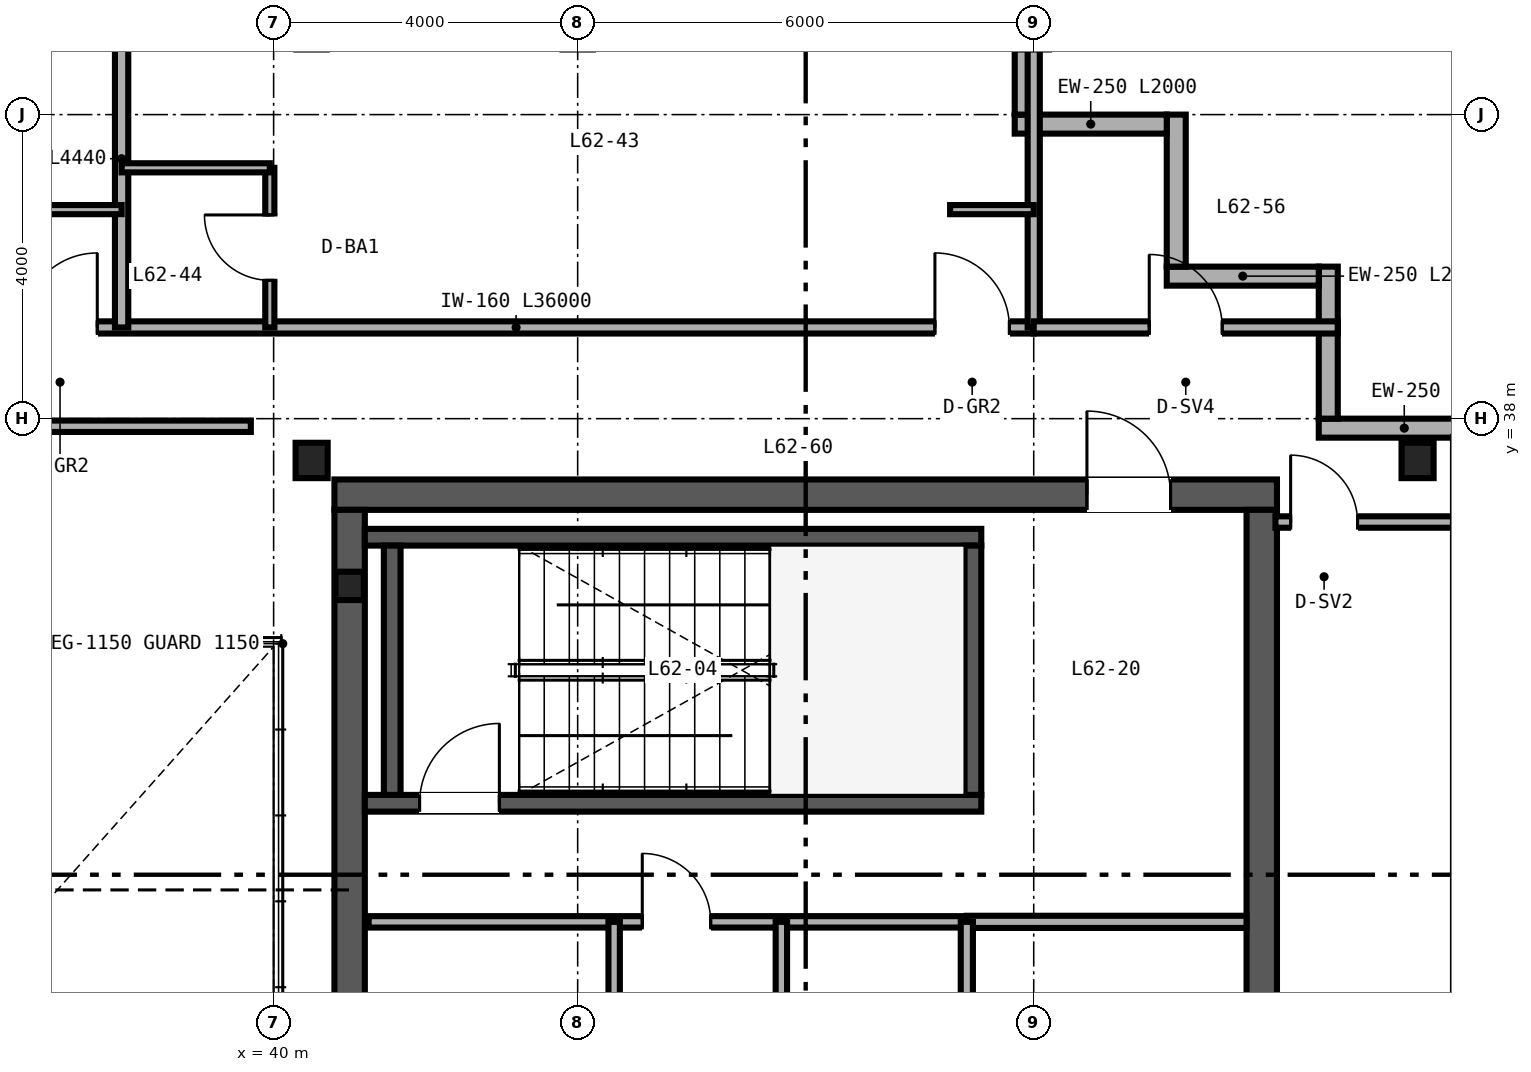
"""IFC4 building model, lengths in metres.
Left out: names, types, materials, properties, quantities, classifications, styles, units other than length and angle.
Written with IfcOpenShell. Run it as: python <this file> out.ifc"""

import sys

from ifc_helpers import new_model, si_unit, direction, frame, frame_2d, origin, origin_2d, place, context, subcontext, project, spatial, rectangle, i_section, extrude, source, transform, mapped, element, fill, save


model = new_model("IFC4")
c1 = context("Model", 3, precision=1e-05, world=origin(), true_north=direction((0.0, 1.0)))
c2 = subcontext(c1, "Body", "Model", "MODEL_VIEW")
j1 = project(units=[si_unit("LENGTHUNIT", "METRE"), si_unit("PLANEANGLEUNIT", "RADIAN")], contexts=[c1])
p1 = place(None, origin())
s1 = spatial("IfcSite", under=j1, at=p1, CompositionType="ELEMENT")
p2 = place(p1, origin())
s2 = spatial("IfcBuilding", under=s1, at=p2, CompositionType="ELEMENT")
p3 = place(p2, frame((0.0, 0.0, 247.2)))
s3 = spatial("IfcBuildingStorey", under=s2, at=p3, CompositionType="ELEMENT", Elevation=247.2)
m1 = source(origin(), c2, "Body", "SweptSolid", [
    extrude(i_section(OverallWidth=0.374, OverallDepth=0.373, WebThickness=0.016, FlangeThickness=0.026, FilletRadius=0.025, at=origin_2d()), origin(), (0.0, 0.0, 1.0), 3.6),
])
p4 = place(p3, frame((41.0, 35.8, 0.0), z_axis=(0.0, 0.0, 1.0), x_axis=(1.0, 0.0, 0.0)))
e1 = element("IfcColumn", 1, at=p4, inside=s3, PredefinedType="COLUMN", context=c2, shape_type="MappedRepresentation", body=[
    mapped(m1, transform((0.0, 0.0, 0.0), scale=1.0)),
])
p5 = place(p3, frame((40.8, 37.0, 0.0), z_axis=(0.0, 0.0, 1.0), x_axis=(1.0, 0.0, 0.0)))
e2 = element("IfcWall", 2, at=p5, inside=s3, PredefinedType="SHEAR", context=c2, shape_type="SweptSolid", body=[
    extrude(rectangle(XDim=12.4, YDim=0.4, at=frame_2d((6.2, 0.0))), origin(), (0.0, 0.0, 1.0), 3.38),
])
p6 = place(p5, frame((9.9, 0.0, 0.0)))
e3 = element("IfcOpeningElement", 3, at=p6, cuts=e2, PredefinedType="OPENING", context=c2, shape_type="SweptSolid", body=[
    extrude(rectangle(XDim=1.1, YDim=2.15, at=frame_2d((0.55, 1.075))), frame((0.0, 0.21, 0.0), z_axis=(0.0, -1.0, 0.0), x_axis=(1.0, 0.0, 0.0)), (0.0, 0.0, 1.0), 0.42),
])
for number, where, z_axis, x_axis in (
    (4, (41.0, 15.2, 0.0), (0.0, 0.0, 1.0), (0.0, 1.0, 0.0)),
    (5, (53.0, 15.2, 0.0), (0.0, 0.0, 1.0), (0.0, 1.0, 0.0)),
):
    element("IfcWall", number, at=place(p3, frame(where, z_axis=z_axis, x_axis=x_axis)), inside=s3, PredefinedType="SHEAR", context=c2, shape_type="SweptSolid", body=[
        extrude(rectangle(XDim=21.6, YDim=0.4, at=frame_2d((10.8, 0.0))), origin(), (0.0, 0.0, 1.0), 3.38),
    ])
p7 = place(p3, frame((41.2, 32.94, 0.0), z_axis=(0.0, 0.0, 1.0), x_axis=(1.0, 0.0, 0.0)))
e6 = element("IfcWall", 6, at=p7, inside=s3, PredefinedType="SHEAR", context=c2, shape_type="SweptSolid", body=[
    extrude(rectangle(XDim=8.11, YDim=0.22, at=frame_2d((4.055, 0.0))), origin(), (0.0, 0.0, 1.0), 3.4),
])
p8 = place(p7, frame((0.72, 0.0, 0.0)))
e7 = element("IfcOpeningElement", 7, at=p8, cuts=e6, PredefinedType="OPENING", context=c2, shape_type="SweptSolid", body=[
    extrude(rectangle(XDim=1.05, YDim=2.15, at=frame_2d((0.525, 1.075))), frame((0.0, 0.12, 0.0), z_axis=(0.0, -1.0, 0.0), x_axis=(1.0, 0.0, 0.0)), (0.0, 0.0, 1.0), 0.24),
])
p9 = place(p3, frame((41.2, 36.44, 0.0), z_axis=(0.0, 0.0, 1.0), x_axis=(1.0, 0.0, 0.0)))
e8 = element("IfcWall", 8, at=p9, inside=s3, PredefinedType="SHEAR", context=c2, shape_type="SweptSolid", body=[
    extrude(rectangle(XDim=8.11, YDim=0.22, at=frame_2d((4.055, 0.0))), origin(), (0.0, 0.0, 1.0), 3.4),
])
for number, where, z_axis, x_axis in (
    (9, (41.56, 33.05, 0.0), (0.0, 0.0, 1.0), (0.0, 1.0, 0.0)),
    (10, (49.2, 33.05, 0.0), (0.0, 0.0, 1.0), (0.0, 1.0, 0.0)),
):
    element("IfcWall", number, at=place(p3, frame(where, z_axis=z_axis, x_axis=x_axis)), inside=s3, PredefinedType="SHEAR", context=c2, shape_type="SweptSolid", body=[
        extrude(rectangle(XDim=3.28, YDim=0.22, at=frame_2d((1.64, 0.0))), origin(), (0.0, 0.0, 1.0), 3.4),
    ])
m2 = source(origin(), c2, "Body", "SweptSolid", [
    extrude(i_section(OverallWidth=0.422, OverallDepth=0.465, WebThickness=0.045, FlangeThickness=0.073, FilletRadius=0.025, at=origin_2d()), origin(), (0.0, 0.0, 1.0), 3.38),
])
for number, where, z_axis, x_axis in (
    (11, (40.5, 37.45, 0.0), (0.0, 0.0, 1.0), (1.0, 0.0, 0.0)),
    (12, (55.05, 37.45, 0.0), (0.0, 0.0, 1.0), (1.0, 0.0, 0.0)),
):
    element("IfcColumn", number, at=place(p3, frame(where, z_axis=z_axis, x_axis=x_axis)), inside=s3, PredefinedType="COLUMN", context=c2, shape_type="MappedRepresentation", body=[
        mapped(m2, transform((0.0, 0.0, 0.0), scale=1.0)),
    ])
p10 = place(p3, frame((56.0, 37.875, 0.0), z_axis=(0.0, 0.0, 1.0), x_axis=(-1.0, 0.0, 0.0)))
e13 = element("IfcWall", 13, at=p10, inside=s3, PredefinedType="SOLIDWALL", context=c2, shape_type="SweptSolid", body=[
    extrude(rectangle(XDim=2.25, YDim=0.25, at=frame_2d((1.125, 0.0))), origin(), (0.0, 0.0, 1.0), 3.38),
])
for number, where, z_axis, x_axis in (
    (14, (53.875, 38.0, 0.0), (0.0, 0.0, 1.0), (0.0, 1.0, 0.0)),
    (15, (53.75, 39.875, 0.0), (0.0, 0.0, 1.0), (-1.0, 0.0, 0.0)),
    (16, (51.875, 40.0, 0.0), (0.0, 0.0, 1.0), (0.0, 1.0, 0.0)),
    (17, (51.75, 41.875, 0.0), (0.0, 0.0, 1.0), (-1.0, 0.0, 0.0)),
):
    element("IfcWall", number, at=place(p3, frame(where, z_axis=z_axis, x_axis=x_axis)), inside=s3, PredefinedType="SOLIDWALL", context=c2, shape_type="SweptSolid", body=[
        extrude(rectangle(XDim=2.0, YDim=0.25, at=frame_2d((1.0, 0.0))), origin(), (0.0, 0.0, 1.0), 3.38),
    ])
p11 = place(p3, frame((49.875, 42.0, 0.0), z_axis=(0.0, 0.0, 1.0), x_axis=(0.0, 1.0, 0.0)))
e18 = element("IfcWall", 18, at=p11, inside=s3, PredefinedType="SOLIDWALL", context=c2, shape_type="SweptSolid", body=[
    extrude(rectangle(XDim=2.0, YDim=0.25, at=frame_2d((1.0, 0.0))), origin(), (0.0, 0.0, 1.0), 2.687),
])
p12 = place(p3, frame((41.25, 31.38, 0.0), z_axis=(0.0, 0.0, 1.0), x_axis=(1.0, 0.0, 0.0)))
e19 = element("IfcWall", 19, at=p12, inside=s3, PredefinedType="PARTITIONING", context=c2, shape_type="SweptSolid", body=[
    extrude(rectangle(XDim=7.87, YDim=0.15, at=frame_2d((3.935, 0.0))), origin(), (0.0, 0.0, 1.0), 2.48),
])
p13 = place(p12, frame((3.6, 0.0, 0.0)))
e20 = element("IfcOpeningElement", 20, at=p13, cuts=e19, PredefinedType="OPENING", context=c2, shape_type="SweptSolid", body=[
    extrude(rectangle(XDim=0.9, YDim=2.15, at=frame_2d((0.45, 1.075))), frame((0.0, 0.085, 0.0), z_axis=(0.0, -1.0, 0.0), x_axis=(1.0, 0.0, 0.0)), (0.0, 0.0, 1.0), 0.17),
])
p14 = place(p3, frame((46.68, 15.25, 0.0), z_axis=(0.0, 0.0, 1.0), x_axis=(0.0, 1.0, 0.0)))
e21 = element("IfcWall", 21, at=p14, inside=s3, PredefinedType="PARTITIONING", context=c2, shape_type="SweptSolid", body=[
    extrude(rectangle(XDim=16.13, YDim=0.15, at=frame_2d((8.065, 0.0))), origin(), (0.0, 0.0, 1.0), 2.453),
])
p15 = place(p14, frame((2.0, 0.0, 0.0)))
e22 = element("IfcOpeningElement", 22, at=p15, cuts=e21, PredefinedType="OPENING", context=c2, shape_type="SweptSolid", body=[
    extrude(rectangle(XDim=0.84, YDim=2.1, at=frame_2d((0.42, 1.05))), frame((0.0, 0.085, 0.0), z_axis=(0.0, -1.0, 0.0), x_axis=(1.0, 0.0, 0.0)), (0.0, 0.0, 1.0), 0.17),
])
p16 = place(p14, frame((7.2, 0.0, 0.0)))
e23 = element("IfcOpeningElement", 23, at=p16, cuts=e21, PredefinedType="OPENING", context=c2, shape_type="SweptSolid", body=[
    extrude(rectangle(XDim=0.84, YDim=2.1, at=frame_2d((0.42, 1.05))), frame((0.0, 0.085, 0.0), z_axis=(0.0, -1.0, 0.0), x_axis=(1.0, 0.0, 0.0)), (0.0, 0.0, 1.0), 0.17),
])
p17 = place(p14, frame((12.6, 0.0, 0.0)))
e24 = element("IfcOpeningElement", 24, at=p17, cuts=e21, PredefinedType="OPENING", context=c2, shape_type="SweptSolid", body=[
    extrude(rectangle(XDim=0.84, YDim=2.1, at=frame_2d((0.42, 1.05))), frame((0.0, 0.085, 0.0), z_axis=(0.0, -1.0, 0.0), x_axis=(1.0, 0.0, 0.0)), (0.0, 0.0, 1.0), 0.17),
])
p18 = place(p3, frame((49.12, 31.38, 0.0), z_axis=(0.0, 0.0, 1.0), x_axis=(1.0, 0.0, 0.0)))
e25 = element("IfcWall", 25, at=p18, inside=s3, PredefinedType="PARTITIONING", context=c2, shape_type="SweptSolid", body=[
    extrude(rectangle(XDim=3.68, YDim=0.16, at=frame_2d((1.84, 0.0))), origin(), (0.0, 0.0, 1.0), 2.48),
])
p19 = place(p3, frame((49.12, 15.25, 0.0), z_axis=(0.0, 0.0, 1.0), x_axis=(0.0, 1.0, 0.0)))
e26 = element("IfcWall", 26, at=p19, inside=s3, PredefinedType="PARTITIONING", context=c2, shape_type="SweptSolid", body=[
    extrude(rectangle(XDim=16.13, YDim=0.16, at=frame_2d((8.065, 0.0))), origin(), (0.0, 0.0, 1.0), 2.453),
])
p20 = place(p19, frame((3.8, 0.0, 0.0)))
e27 = element("IfcOpeningElement", 27, at=p20, cuts=e26, PredefinedType="OPENING", context=c2, shape_type="SweptSolid", body=[
    extrude(rectangle(XDim=0.92, YDim=2.15, at=frame_2d((0.46, 1.075))), frame((0.0, 0.09, 0.0), z_axis=(0.0, -1.0, 0.0), x_axis=(1.0, 0.0, 0.0)), (0.0, 0.0, 1.0), 0.18),
])
p21 = place(p19, frame((11.8, 0.0, 0.0)))
e28 = element("IfcOpeningElement", 28, at=p21, cuts=e26, PredefinedType="OPENING", context=c2, shape_type="SweptSolid", body=[
    extrude(rectangle(XDim=0.9, YDim=2.15, at=frame_2d((0.45, 1.075))), frame((0.0, 0.09, 0.0), z_axis=(0.0, -1.0, 0.0), x_axis=(1.0, 0.0, 0.0)), (0.0, 0.0, 1.0), 0.18),
])
p22 = place(p3, frame((44.48, 15.25, 0.0), z_axis=(0.0, 0.0, 1.0), x_axis=(0.0, 1.0, 0.0)))
e29 = element("IfcWall", 29, at=p22, inside=s3, PredefinedType="PARTITIONING", context=c2, shape_type="SweptSolid", body=[
    extrude(rectangle(XDim=16.13, YDim=0.15, at=frame_2d((8.065, 0.0))), origin(), (0.0, 0.0, 1.0), 2.453),
])
p23 = place(p22, frame((1.6, 0.0, 0.0)))
e30 = element("IfcOpeningElement", 30, at=p23, cuts=e29, PredefinedType="OPENING", context=c2, shape_type="SweptSolid", body=[
    extrude(rectangle(XDim=0.84, YDim=2.1, at=frame_2d((0.42, 1.05))), frame((0.0, 0.085, 0.0), z_axis=(0.0, -1.0, 0.0), x_axis=(1.0, 0.0, 0.0)), (0.0, 0.0, 1.0), 0.17),
])
p24 = place(p22, frame((5.85, 0.0, 0.0)))
e31 = element("IfcOpeningElement", 31, at=p24, cuts=e29, PredefinedType="OPENING", context=c2, shape_type="SweptSolid", body=[
    extrude(rectangle(XDim=0.84, YDim=2.1, at=frame_2d((0.42, 1.05))), frame((0.0, 0.085, 0.0), z_axis=(0.0, -1.0, 0.0), x_axis=(1.0, 0.0, 0.0)), (0.0, 0.0, 1.0), 0.17),
])
p25 = place(p22, frame((10.05, 0.0, 0.0)))
e32 = element("IfcOpeningElement", 32, at=p25, cuts=e29, PredefinedType="OPENING", context=c2, shape_type="SweptSolid", body=[
    extrude(rectangle(XDim=0.84, YDim=2.1, at=frame_2d((0.42, 1.05))), frame((0.0, 0.085, 0.0), z_axis=(0.0, -1.0, 0.0), x_axis=(1.0, 0.0, 0.0)), (0.0, 0.0, 1.0), 0.17),
])
p26 = place(p3, frame((24.3, 37.9, 0.0), z_axis=(0.0, 0.0, 1.0), x_axis=(1.0, 0.0, 0.0)))
e33 = element("IfcWall", 33, at=p26, inside=s3, PredefinedType="PARTITIONING", context=c2, shape_type="SweptSolid", body=[
    extrude(rectangle(XDim=15.4, YDim=0.15, at=frame_2d((7.7, 0.0))), origin(), (0.0, 0.0, 1.0), 3.38),
])
p27 = place(p26, frame((7.0, 0.0, 0.0)))
e34 = element("IfcOpeningElement", 34, at=p27, cuts=e33, PredefinedType="OPENING", context=c2, shape_type="SweptSolid", body=[
    extrude(rectangle(XDim=0.96, YDim=2.15, at=frame_2d((0.48, 1.075))), frame((0.0, 0.085, 0.0), z_axis=(0.0, -1.0, 0.0), x_axis=(1.0, 0.0, 0.0)), (0.0, 0.0, 1.0), 0.17),
])
p28 = place(p3, frame((14.0, 39.2, 0.0), z_axis=(0.0, 0.0, 1.0), x_axis=(1.0, 0.0, 0.0)))
e35 = element("IfcWall", 35, at=p28, inside=s3, PredefinedType="PARTITIONING", context=c2, shape_type="SweptSolid", body=[
    extrude(rectangle(XDim=36.0, YDim=0.16, at=frame_2d((18.0, 0.0))), origin(), (0.0, 0.0, 1.0), 2.923),
])
p29 = place(p28, frame((10.7, 0.0, 0.0)))
e36 = element("IfcOpeningElement", 36, at=p29, cuts=e35, PredefinedType="OPENING", context=c2, shape_type="SweptSolid", body=[
    extrude(rectangle(XDim=0.98, YDim=2.2, at=frame_2d((0.49, 1.1))), frame((0.0, 0.09, 0.0), z_axis=(0.0, -1.0, 0.0), x_axis=(1.0, 0.0, 0.0)), (0.0, 0.0, 1.0), 0.18),
])
p30 = place(p28, frame((22.7, 0.0, 0.0)))
e37 = element("IfcOpeningElement", 37, at=p30, cuts=e35, PredefinedType="OPENING", context=c2, shape_type="SweptSolid", body=[
    extrude(rectangle(XDim=0.98, YDim=2.2, at=frame_2d((0.49, 1.1))), frame((0.0, 0.09, 0.0), z_axis=(0.0, -1.0, 0.0), x_axis=(1.0, 0.0, 0.0)), (0.0, 0.0, 1.0), 0.18),
])
p31 = place(p28, frame((34.7, 0.0, 0.0)))
e38 = element("IfcOpeningElement", 38, at=p31, cuts=e35, PredefinedType="OPENING", context=c2, shape_type="SweptSolid", body=[
    extrude(rectangle(XDim=0.98, YDim=2.2, at=frame_2d((0.49, 1.1))), frame((0.0, 0.09, 0.0), z_axis=(0.0, -1.0, 0.0), x_axis=(1.0, 0.0, 0.0)), (0.0, 0.0, 1.0), 0.18),
])
p32 = place(p3, frame((50.0, 39.2, 0.0), z_axis=(0.0, 0.0, 1.0), x_axis=(0.0, 1.0, 0.0)))
e39 = element("IfcWall", 39, at=p32, inside=s3, PredefinedType="PARTITIONING", context=c2, shape_type="SweptSolid", body=[
    extrude(rectangle(XDim=4.44, YDim=0.16, at=frame_2d((2.22, 0.0))), origin(), (0.0, 0.0, 1.0), 2.687),
])
p33 = place(p3, frame((38.0, 39.2, 0.0), z_axis=(0.0, 0.0, 1.0), x_axis=(0.0, 1.0, 0.0)))
e40 = element("IfcWall", 40, at=p33, inside=s3, PredefinedType="PARTITIONING", context=c2, shape_type="SweptSolid", body=[
    extrude(rectangle(XDim=4.44, YDim=0.175, at=frame_2d((2.22, 0.0))), origin(), (0.0, 0.0, 1.0), 2.432),
])
p34 = place(p3, frame((36.9, 40.75, 0.0), z_axis=(0.0, 0.0, 1.0), x_axis=(1.0, 0.0, 0.0)))
e41 = element("IfcWall", 41, at=p34, inside=s3, PredefinedType="PARTITIONING", context=c2, shape_type="SweptSolid", body=[
    extrude(rectangle(XDim=1.1, YDim=0.12, at=frame_2d((0.55, 0.0))), origin(), (0.0, 0.0, 1.0), 3.38),
])
p35 = place(p3, frame((39.95, 39.2, 0.0), z_axis=(0.0, 0.0, 1.0), x_axis=(0.0, 1.0, 0.0)))
e42 = element("IfcWall", 42, at=p35, inside=s3, PredefinedType="PARTITIONING", context=c2, shape_type="SweptSolid", body=[
    extrude(rectangle(XDim=2.1, YDim=0.12, at=frame_2d((1.05, 0.0))), origin(), (0.0, 0.0, 1.0), 3.38),
])
p36 = place(p35, frame((0.62, 0.0, 0.0)))
e43 = element("IfcOpeningElement", 43, at=p36, cuts=e42, PredefinedType="OPENING", context=c2, shape_type="SweptSolid", body=[
    extrude(rectangle(XDim=0.86, YDim=2.1, at=frame_2d((0.43, 1.05))), frame((0.0, 0.07, 0.0), z_axis=(0.0, -1.0, 0.0), x_axis=(1.0, 0.0, 0.0)), (0.0, 0.0, 1.0), 0.14),
])
p37 = place(p3, frame((38.0, 41.3, 0.0), z_axis=(0.0, 0.0, 1.0), x_axis=(1.0, 0.0, 0.0)))
e44 = element("IfcWall", 44, at=p37, inside=s3, PredefinedType="PARTITIONING", context=c2, shape_type="SweptSolid", body=[
    extrude(rectangle(XDim=1.95, YDim=0.12, at=frame_2d((0.975, 0.0))), origin(), (0.0, 0.0, 1.0), 3.38),
])
p38 = place(p3, frame((48.9, 40.75, 0.0), z_axis=(0.0, 0.0, 1.0), x_axis=(1.0, 0.0, 0.0)))
e45 = element("IfcWall", 45, at=p38, inside=s3, PredefinedType="PARTITIONING", context=c2, shape_type="SweptSolid", body=[
    extrude(rectangle(XDim=1.1, YDim=0.12, at=frame_2d((0.55, 0.0))), origin(), (0.0, 0.0, 1.0), 3.38),
])
p39 = place(p3, frame((53.18, 36.64, 0.0), z_axis=(0.0, 0.0, 1.0), x_axis=(1.0, 0.0, 0.0)))
e46 = element("IfcWall", 46, at=p39, inside=s3, PredefinedType="PARTITIONING", context=c2, shape_type="SweptSolid", body=[
    extrude(rectangle(XDim=2.66, YDim=0.15, at=frame_2d((1.33, 0.0))), origin(), (0.0, 0.0, 1.0), 2.763),
])
p40 = place(p39, frame((0.2, 0.0, 0.0)))
e47 = element("IfcOpeningElement", 47, at=p40, cuts=e46, PredefinedType="OPENING", context=c2, shape_type="SweptSolid", body=[
    extrude(rectangle(XDim=0.88, YDim=2.15, at=frame_2d((0.44, 1.075))), frame((0.0, 0.085, 0.0), z_axis=(0.0, -1.0, 0.0), x_axis=(1.0, 0.0, 0.0)), (0.0, 0.0, 1.0), 0.17),
])
p41 = place(p3, frame((50.0, 39.2, 0.0), z_axis=(0.0, 0.0, 1.0), x_axis=(1.0, 0.0, 0.0)))
e48 = element("IfcWall", 48, at=p41, inside=s3, PredefinedType="PARTITIONING", context=c2, shape_type="SweptSolid", body=[
    extrude(rectangle(XDim=4.0, YDim=0.16, at=frame_2d((2.0, 0.0))), origin(), (0.0, 0.0, 1.0), 3.38),
])
p42 = place(p41, frame((1.52, 0.0, 0.0)))
e49 = element("IfcOpeningElement", 49, at=p42, cuts=e48, PredefinedType="OPENING", context=c2, shape_type="SweptSolid", body=[
    extrude(rectangle(XDim=0.96, YDim=2.15, at=frame_2d((0.48, 1.075))), frame((0.0, 0.09, 0.0), z_axis=(0.0, -1.0, 0.0), x_axis=(1.0, 0.0, 0.0)), (0.0, 0.0, 1.0), 0.18),
])
m3 = source(origin(), c2, "Body", "SweptSolid", [
    extrude(rectangle(XDim=1.05, YDim=2.15, at=frame_2d((0.525, 1.075))), frame((0.0, 0.025, 0.0), z_axis=(0.0, -1.0, 0.0), x_axis=(1.0, 0.0, 0.0)), (0.0, 0.0, 1.0), 0.05),
])
p43 = place(p8, origin())
e50 = element("IfcDoor", 50, at=p43, inside=s3, OperationType="SINGLE_SWING_RIGHT", PredefinedType="DOOR", context=c2, shape_type="MappedRepresentation", body=[
    mapped(m3, transform((0.0, 0.0, 0.0), scale=1.0)),
])
fill(e7, e50)
m4 = source(origin(), c2, "Body", "SweptSolid", [
    extrude(rectangle(XDim=0.9, YDim=2.15, at=frame_2d((0.45, 1.075))), frame((0.0, 0.025, 0.0), z_axis=(0.0, -1.0, 0.0), x_axis=(1.0, 0.0, 0.0)), (0.0, 0.0, 1.0), 0.05),
])
p44 = place(p13, origin())
e51 = element("IfcDoor", 51, at=p44, inside=s3, OperationType="SINGLE_SWING_LEFT", PredefinedType="DOOR", context=c2, shape_type="MappedRepresentation", body=[
    mapped(m4, transform((0.0, 0.0, 0.0), scale=1.0)),
])
fill(e20, e51)
m5 = source(origin(), c2, "Body", "SweptSolid", [
    extrude(rectangle(XDim=1.1, YDim=2.15, at=frame_2d((0.55, 1.075))), frame((0.0, 0.025, 0.0), z_axis=(0.0, -1.0, 0.0), x_axis=(1.0, 0.0, 0.0)), (0.0, 0.0, 1.0), 0.05),
])
p45 = place(p6, origin())
e52 = element("IfcDoor", 52, at=p45, inside=s3, OperationType="SINGLE_SWING_LEFT", PredefinedType="DOOR", context=c2, shape_type="MappedRepresentation", body=[
    mapped(m5, transform((0.0, 0.0, 0.0), scale=1.0)),
])
fill(e3, e52)
m6 = source(origin(), c2, "Body", "SweptSolid", [
    extrude(rectangle(XDim=0.86, YDim=2.1, at=frame_2d((0.43, 1.05))), frame((0.0, 0.025, 0.0), z_axis=(0.0, -1.0, 0.0), x_axis=(1.0, 0.0, 0.0)), (0.0, 0.0, 1.0), 0.05),
])
p46 = place(p36, origin())
e53 = element("IfcDoor", 53, at=p46, inside=s3, OperationType="SINGLE_SWING_RIGHT", PredefinedType="DOOR", context=c2, shape_type="MappedRepresentation", body=[
    mapped(m6, transform((0.0, 0.0, 0.0), scale=1.0)),
])
fill(e43, e53)
m7 = source(origin(), c2, "Body", "SweptSolid", [
    extrude(rectangle(XDim=0.98, YDim=2.2, at=frame_2d((0.49, 1.1))), frame((0.0, 0.025, 0.0), z_axis=(0.0, -1.0, 0.0), x_axis=(1.0, 0.0, 0.0)), (0.0, 0.0, 1.0), 0.05),
])
p47 = place(p30, origin())
e54 = element("IfcDoor", 54, at=p47, inside=s3, OperationType="SINGLE_SWING_RIGHT", PredefinedType="DOOR", context=c2, shape_type="MappedRepresentation", body=[
    mapped(m7, transform((0.0, 0.0, 0.0), scale=1.0)),
])
fill(e37, e54)
p48 = place(p31, origin())
e55 = element("IfcDoor", 55, at=p48, inside=s3, OperationType="SINGLE_SWING_LEFT", PredefinedType="DOOR", context=c2, shape_type="MappedRepresentation", body=[
    mapped(m7, transform((0.0, 0.0, 0.0), scale=1.0)),
])
fill(e38, e55)
m8 = source(origin(), c2, "Body", "SweptSolid", [
    extrude(rectangle(XDim=0.88, YDim=2.15, at=frame_2d((0.44, 1.075))), frame((0.0, 0.025, 0.0), z_axis=(0.0, -1.0, 0.0), x_axis=(1.0, 0.0, 0.0)), (0.0, 0.0, 1.0), 0.05),
])
p49 = place(p40, origin())
e56 = element("IfcDoor", 56, at=p49, inside=s3, OperationType="SINGLE_SWING_LEFT", PredefinedType="DOOR", context=c2, shape_type="MappedRepresentation", body=[
    mapped(m8, transform((0.0, 0.0, 0.0), scale=1.0)),
])
fill(e47, e56)
m9 = source(origin(), c2, "Body", "SweptSolid", [
    extrude(rectangle(XDim=0.96, YDim=2.15, at=frame_2d((0.48, 1.075))), frame((0.0, 0.025, 0.0), z_axis=(0.0, -1.0, 0.0), x_axis=(1.0, 0.0, 0.0)), (0.0, 0.0, 1.0), 0.05),
])
p50 = place(p42, origin())
e57 = element("IfcDoor", 57, at=p50, inside=s3, OperationType="SINGLE_SWING_LEFT", PredefinedType="DOOR", context=c2, shape_type="MappedRepresentation", body=[
    mapped(m9, transform((0.0, 0.0, 0.0), scale=1.0)),
])
fill(e49, e57)
save(model, sys.argv[1])
